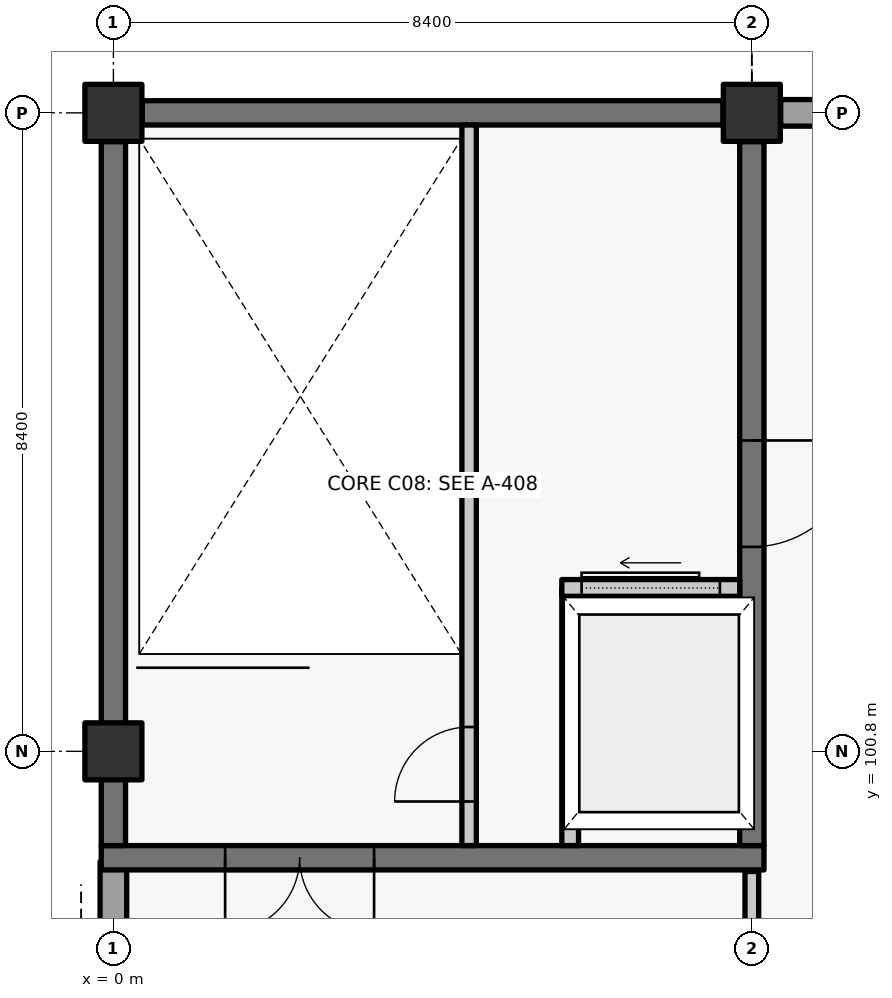
"""IFC4 building model, lengths in metres.
Left out: names, types, materials, properties, quantities, classifications, styles, units other than length and angle.
Written with IfcOpenShell. Run it as: python <this file> out.ifc"""

import sys

from ifc_helpers import new_model, si_unit, direction, frame, frame_2d, origin, origin_2d, place, context, subcontext, project, spatial, rectangle, extrude, element, fill, save


model = new_model("IFC4")
c1 = context("Model", 3, precision=1e-05, world=origin(), true_north=direction((0.0, 1.0)))
c2 = subcontext(c1, "Body", "Model", "MODEL_VIEW")
j1 = project(units=[si_unit("LENGTHUNIT", "METRE"), si_unit("PLANEANGLEUNIT", "RADIAN")], contexts=[c1])
p1 = place(None, origin())
s1 = spatial("IfcSite", under=j1, at=p1, CompositionType="ELEMENT")
p2 = place(p1, origin())
s2 = spatial("IfcBuilding", under=s1, at=p2, CompositionType="ELEMENT")
p3 = place(p2, frame((0.0, 0.0, 11.4)))
s3 = spatial("IfcBuildingStorey", under=s2, at=p3, CompositionType="ELEMENT", Elevation=11.4)
for number, where, z_axis, x_axis in (
    (1, (0.0, 100.8, 0.0), (0.0, 0.0, 1.0), (1.0, 0.0, 0.0)),
    (2, (0.0, 109.2, 0.0), (0.0, 0.0, 1.0), (1.0, 0.0, 0.0)),
    (3, (8.4, 109.2, 0.0), (0.0, 0.0, 1.0), (1.0, 0.0, 0.0)),
):
    element("IfcColumn", number, at=place(p3, frame(where, z_axis=z_axis, x_axis=x_axis)), inside=s3, PredefinedType="COLUMN", context=c2, shape_type="SweptSolid", body=[
        extrude(rectangle(XDim=0.75, YDim=0.75, at=origin_2d()), origin(), (0.0, 0.0, 1.0), 4.8),
    ])
p4 = place(p3, frame((0.0, 92.78, 0.0), z_axis=(0.0, 0.0, 1.0), x_axis=(0.0, 1.0, 0.0)))
e4 = element("IfcWall", 4, at=p4, inside=s3, PredefinedType="SOLIDWALL", context=c2, shape_type="SweptSolid", body=[
    extrude(rectangle(XDim=6.57, YDim=0.35, at=frame_2d((3.285, 0.0))), origin(), (0.0, 0.0, 1.0), 4.52),
])
p5 = place(p4, frame((1.735, 0.0, 1.35)))
e5 = element("IfcOpeningElement", 5, at=p5, cuts=e4, PredefinedType="OPENING", context=c2, shape_type="SweptSolid", body=[
    extrude(rectangle(XDim=3.2, YDim=1.3, at=frame_2d((1.6, 0.65))), frame((0.0, 0.185, 0.0), z_axis=(0.0, -1.0, 0.0), x_axis=(1.0, 0.0, 0.0)), (0.0, 0.0, 1.0), 0.37),
])
p6 = place(p3, frame((8.78, 109.2, 0.0), z_axis=(0.0, 0.0, 1.0), x_axis=(1.0, 0.0, 0.0)))
e6 = element("IfcWall", 6, at=p6, inside=s3, PredefinedType="SOLIDWALL", context=c2, shape_type="SweptSolid", body=[
    extrude(rectangle(XDim=7.64, YDim=0.35, at=frame_2d((3.82, 0.0))), origin(), (0.0, 0.0, 1.0), 4.52),
])
p7 = place(p6, frame((2.02, 0.0, 1.4)))
e7 = element("IfcOpeningElement", 7, at=p7, cuts=e6, PredefinedType="OPENING", context=c2, shape_type="SweptSolid", body=[
    extrude(rectangle(XDim=3.6, YDim=1.35, at=frame_2d((1.8, 0.675))), frame((0.0, 0.185, 0.0), z_axis=(0.0, -1.0, 0.0), x_axis=(1.0, 0.0, 0.0)), (0.0, 0.0, 1.0), 0.37),
])
p8 = place(p3, frame((8.56, 99.4, 0.0), z_axis=(0.0, 0.0, 1.0), x_axis=(-1.0, 0.0, 0.0)))
e8 = element("IfcWall", 8, at=p8, inside=s3, PredefinedType="SHEAR", context=c2, shape_type="SweptSolid", body=[
    extrude(rectangle(XDim=8.72, YDim=0.32, at=frame_2d((4.36, 0.0))), origin(), (0.0, 0.0, 1.0), 4.52),
])
p9 = place(p8, frame((5.13, 0.0, 0.0)))
e9 = element("IfcOpeningElement", 9, at=p9, cuts=e8, PredefinedType="OPENING", context=c2, shape_type="SweptSolid", body=[
    extrude(rectangle(XDim=1.96, YDim=2.2, at=frame_2d((0.98, 1.1))), frame((0.0, 0.17, 0.0), z_axis=(0.0, -1.0, 0.0), x_axis=(1.0, 0.0, 0.0)), (0.0, 0.0, 1.0), 0.34),
])
p10 = place(p3, frame((0.0, 99.56, 0.0), z_axis=(0.0, 0.0, 1.0), x_axis=(0.0, 1.0, 0.0)))
e10 = element("IfcWall", 10, at=p10, inside=s3, PredefinedType="SHEAR", context=c2, shape_type="SweptSolid", body=[
    extrude(rectangle(XDim=9.26, YDim=0.32, at=frame_2d((4.63, 0.0))), origin(), (0.0, 0.0, 1.0), 4.52),
])
p11 = place(p3, frame((0.38, 109.2, 0.0), z_axis=(0.0, 0.0, 1.0), x_axis=(1.0, 0.0, 0.0)))
e11 = element("IfcWall", 11, at=p11, inside=s3, PredefinedType="SHEAR", context=c2, shape_type="SweptSolid", body=[
    extrude(rectangle(XDim=7.64, YDim=0.32, at=frame_2d((3.82, 0.0))), origin(), (0.0, 0.0, 1.0), 4.52),
])
p12 = place(p3, frame((8.4, 108.82, 0.0), z_axis=(0.0, 0.0, 1.0), x_axis=(0.0, -1.0, 0.0)))
e12 = element("IfcWall", 12, at=p12, inside=s3, PredefinedType="SHEAR", context=c2, shape_type="SweptSolid", body=[
    extrude(rectangle(XDim=9.26, YDim=0.32, at=frame_2d((4.63, 0.0))), origin(), (0.0, 0.0, 1.0), 4.52),
])
p13 = place(p12, frame((3.93, 0.0, 0.0)))
e13 = element("IfcOpeningElement", 13, at=p13, cuts=e12, PredefinedType="OPENING", context=c2, shape_type="SweptSolid", body=[
    extrude(rectangle(XDim=1.4, YDim=2.2, at=frame_2d((0.7, 1.1))), frame((0.0, 0.17, 0.0), z_axis=(0.0, -1.0, 0.0), x_axis=(1.0, 0.0, 0.0)), (0.0, 0.0, 1.0), 0.34),
])
p14 = place(p3, frame((4.68, 99.56, 0.0), z_axis=(0.0, 0.0, 1.0), x_axis=(0.0, 1.0, 0.0)))
e14 = element("IfcWall", 14, at=p14, inside=s3, PredefinedType="SOLIDWALL", context=c2, shape_type="SweptSolid", body=[
    extrude(rectangle(XDim=9.48, YDim=0.19, at=frame_2d((4.74, 0.0))), origin(), (0.0, 0.0, 1.0), 4.52),
])
p15 = place(p14, frame((0.58, 0.0, 0.0)))
e15 = element("IfcOpeningElement", 15, at=p15, cuts=e14, PredefinedType="OPENING", context=c2, shape_type="SweptSolid", body=[
    extrude(rectangle(XDim=0.98, YDim=2.15, at=frame_2d((0.49, 1.075))), frame((0.0, 0.105, 0.0), z_axis=(0.0, -1.0, 0.0), x_axis=(1.0, 0.0, 0.0)), (0.0, 0.0, 1.0), 0.21),
])
p16 = place(p3, frame((6.01, 99.56, 0.0), z_axis=(0.0, 0.0, 1.0), x_axis=(0.0, 1.0, 0.0)))
e16 = element("IfcWall", 16, at=p16, inside=s3, PredefinedType="SOLIDWALL", context=c2, shape_type="SweptSolid", body=[
    extrude(rectangle(XDim=3.39, YDim=0.22, at=frame_2d((1.695, 0.0))), origin(), (0.0, 0.0, 1.0), 4.52),
])
p17 = place(p3, frame((5.9, 102.95, 0.0), z_axis=(0.0, 0.0, 1.0), x_axis=(1.0, 0.0, 0.0)))
e17 = element("IfcWall", 17, at=p17, inside=s3, PredefinedType="SOLIDWALL", context=c2, shape_type="SweptSolid", body=[
    extrude(rectangle(XDim=2.34, YDim=0.22, at=frame_2d((1.17, 0.0))), origin(), (0.0, 0.0, 1.0), 4.52),
])
p18 = place(p17, frame((0.26, 0.0, 0.0)))
e18 = element("IfcOpeningElement", 18, at=p18, cuts=e17, PredefinedType="OPENING", context=c2, shape_type="SweptSolid", body=[
    extrude(rectangle(XDim=1.82, YDim=2.4, at=frame_2d((0.91, 1.2))), frame((0.0, 0.12, 0.0), z_axis=(0.0, -1.0, 0.0), x_axis=(1.0, 0.0, 0.0)), (0.0, 0.0, 1.0), 0.24),
])
p19 = place(p3, frame((8.4, 92.85, 0.0), z_axis=(0.0, 0.0, 1.0), x_axis=(0.0, 1.0, 0.0)))
e19 = element("IfcWall", 19, at=p19, inside=s3, PredefinedType="PARTITIONING", context=c2, shape_type="SweptSolid", body=[
    extrude(rectangle(XDim=6.37, YDim=0.18, at=frame_2d((3.185, 0.0))), origin(), (0.0, 0.0, 1.0), 4.52),
])
p20 = place(p15, origin())
e20 = element("IfcDoor", 20, at=p20, inside=s3, OperationType="SINGLE_SWING_LEFT", PredefinedType="DOOR", context=c2, shape_type="SweptSolid", body=[
    extrude(rectangle(XDim=0.98, YDim=2.15, at=frame_2d((0.49, 1.075))), frame((0.0, 0.025, 0.0), z_axis=(0.0, -1.0, 0.0), x_axis=(1.0, 0.0, 0.0)), (0.0, 0.0, 1.0), 0.05),
])
fill(e15, e20)
p21 = place(p9, origin())
e21 = element("IfcDoor", 21, at=p21, inside=s3, OperationType="DOUBLE_DOOR_SINGLE_SWING", PredefinedType="DOOR", context=c2, shape_type="SweptSolid", body=[
    extrude(rectangle(XDim=1.96, YDim=2.2, at=frame_2d((0.98, 1.1))), frame((0.0, 0.025, 0.0), z_axis=(0.0, -1.0, 0.0), x_axis=(1.0, 0.0, 0.0)), (0.0, 0.0, 1.0), 0.05),
])
fill(e9, e21)
p22 = place(p13, origin())
e22 = element("IfcDoor", 22, at=p22, inside=s3, OperationType="SINGLE_SWING_LEFT", PredefinedType="DOOR", context=c2, shape_type="SweptSolid", body=[
    extrude(rectangle(XDim=1.4, YDim=2.2, at=frame_2d((0.7, 1.1))), frame((0.0, 0.025, 0.0), z_axis=(0.0, -1.0, 0.0), x_axis=(1.0, 0.0, 0.0)), (0.0, 0.0, 1.0), 0.05),
])
fill(e13, e22)
p23 = place(p18, origin())
e23 = element("IfcDoor", 23, at=p23, inside=s3, OperationType="SLIDING_TO_LEFT", PredefinedType="DOOR", context=c2, shape_type="SweptSolid", body=[
    extrude(rectangle(XDim=1.82, YDim=2.4, at=frame_2d((0.91, 1.2))), frame((0.0, 0.025, 0.0), z_axis=(0.0, -1.0, 0.0), x_axis=(1.0, 0.0, 0.0)), (0.0, 0.0, 1.0), 0.05),
])
fill(e18, e23)
save(model, sys.argv[1])
